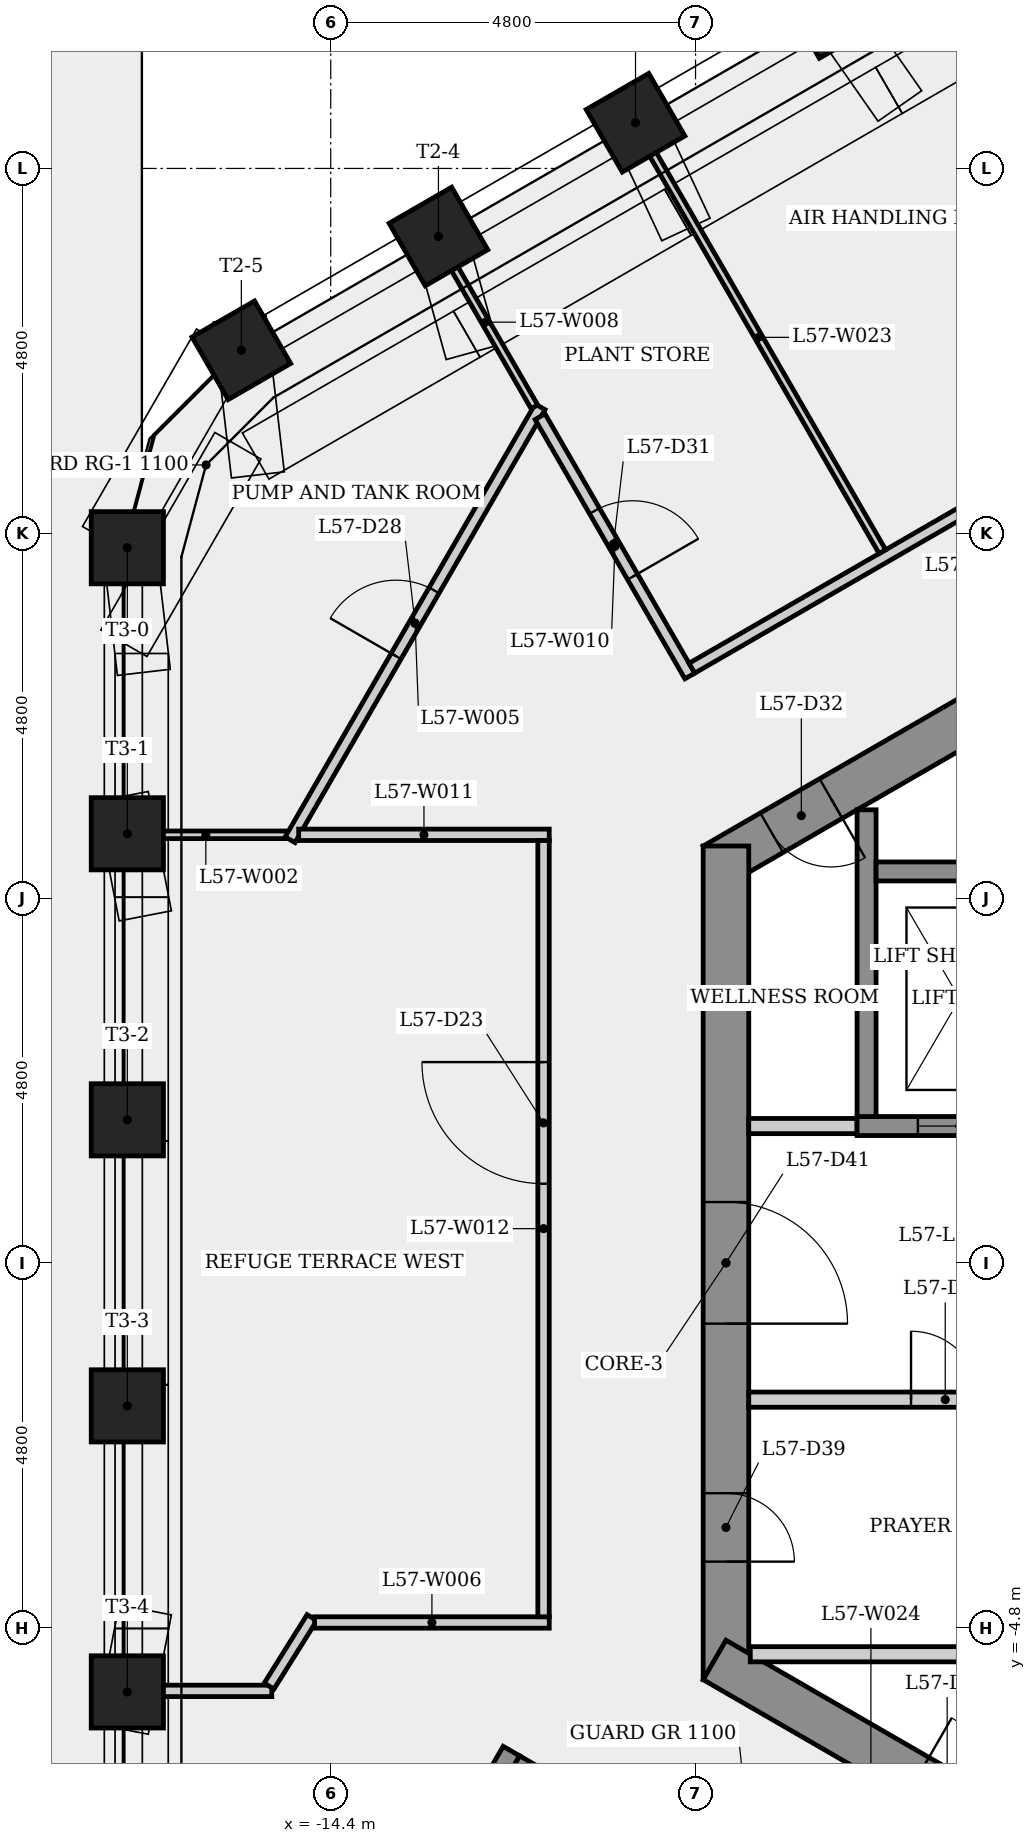
"""IFC4 building model, lengths in metres.
Left out: names, types, materials, properties, quantities, classifications, styles, units other than length and angle.
Written with IfcOpenShell. Run it as: python <this file> out.ifc"""

import sys

from ifc_helpers import new_model, si_unit, direction, frame, frame_2d, origin, origin_2d, place, context, subcontext, project, spatial, rectangle, extrude, element, fill, save


model = new_model("IFC4")
c1 = context("Model", 3, precision=1e-05, world=origin(), true_north=direction((0.0, 1.0)))
c2 = subcontext(c1, "Body", "Model", "MODEL_VIEW")
j1 = project(units=[si_unit("LENGTHUNIT", "METRE"), si_unit("PLANEANGLEUNIT", "RADIAN")], contexts=[c1])
p1 = place(None, origin())
s1 = spatial("IfcSite", under=j1, at=p1, CompositionType="ELEMENT")
p2 = place(p1, origin())
s2 = spatial("IfcBuilding", under=s1, at=p2, CompositionType="ELEMENT")
p3 = place(p2, frame((0.0, 0.0, 214.1)))
s3 = spatial("IfcBuildingStorey", under=s2, at=p3, CompositionType="ELEMENT", Elevation=214.1)
p4 = place(p3, frame((0.15, 10.71, 0.0), z_axis=(0.0, 0.0, 1.0), x_axis=(-0.866023993627, -0.500002442456, 0.0)))
e1 = element("IfcWall", 1, at=p4, inside=s3, PredefinedType="SHEAR", context=c2, shape_type="SweptSolid", body=[
    extrude(rectangle(XDim=10.97, YDim=0.6, at=frame_2d((5.485, 0.0))), origin(), (0.0, 0.0, 1.0), 4.8),
])
p5 = place(p4, frame((9.201, 0.0, 0.0)))
e2 = element("IfcOpeningElement", 2, at=p5, cuts=e1, PredefinedType="OPENING", context=c2, shape_type="SweptSolid", body=[
    extrude(rectangle(XDim=0.9, YDim=2.1, at=frame_2d((0.45, 1.05))), frame((0.0, 0.31, 0.0), z_axis=(0.0, -1.0, 0.0), x_axis=(1.0, 0.0, 0.0)), (0.0, 0.0, 1.0), 0.62),
])
p6 = place(p4, frame((1.744, 0.0, 0.0)))
e3 = element("IfcOpeningElement", 3, at=p6, cuts=e1, PredefinedType="OPENING", context=c2, shape_type="SweptSolid", body=[
    extrude(rectangle(XDim=0.9, YDim=2.1, at=frame_2d((0.45, 1.05))), frame((0.0, 0.31, 0.0), z_axis=(0.0, -1.0, 0.0), x_axis=(1.0, 0.0, 0.0)), (0.0, 0.0, 1.0), 0.62),
])
p7 = place(p3, frame((-9.2, 5.485, 0.0), z_axis=(0.0, 0.0, 1.0), x_axis=(0.0, -1.0, 0.0)))
e4 = element("IfcWall", 4, at=p7, inside=s3, PredefinedType="SHEAR", context=c2, shape_type="SweptSolid", body=[
    extrude(rectangle(XDim=10.97, YDim=0.6, at=frame_2d((5.485, 0.0))), origin(), (0.0, 0.0, 1.0), 4.8),
])
p8 = place(p7, frame((8.516, 0.0, 0.0)))
e5 = element("IfcOpeningElement", 5, at=p8, cuts=e4, PredefinedType="OPENING", context=c2, shape_type="SweptSolid", body=[
    extrude(rectangle(XDim=0.9, YDim=2.1, at=frame_2d((0.45, 1.05))), frame((0.0, 0.31, 0.0), z_axis=(0.0, -1.0, 0.0), x_axis=(1.0, 0.0, 0.0)), (0.0, 0.0, 1.0), 0.62),
])
p9 = place(p7, frame((4.685, 0.0, 0.0)))
e6 = element("IfcOpeningElement", 6, at=p9, cuts=e4, PredefinedType="OPENING", context=c2, shape_type="SweptSolid", body=[
    extrude(rectangle(XDim=1.6, YDim=2.1, at=frame_2d((0.8, 1.05))), frame((0.0, 0.31, 0.0), z_axis=(0.0, -1.0, 0.0), x_axis=(1.0, 0.0, 0.0)), (0.0, 0.0, 1.0), 0.62),
])
p10 = place(p3, frame((-9.35, -5.225, 0.0), z_axis=(0.0, 0.0, 1.0), x_axis=(0.866023993627, -0.500002442456, 0.0)))
e7 = element("IfcWall", 7, at=p10, inside=s3, PredefinedType="SHEAR", context=c2, shape_type="SweptSolid", body=[
    extrude(rectangle(XDim=10.97, YDim=0.6, at=frame_2d((5.485, 0.0))), origin(), (0.0, 0.0, 1.0), 4.8),
])
p11 = place(p10, frame((3.084, 0.0, 0.0)))
e8 = element("IfcOpeningElement", 8, at=p11, cuts=e7, PredefinedType="OPENING", context=c2, shape_type="SweptSolid", body=[
    extrude(rectangle(XDim=0.9, YDim=2.1, at=frame_2d((0.45, 1.05))), frame((0.0, 0.31, 0.0), z_axis=(0.0, -1.0, 0.0), x_axis=(1.0, 0.0, 0.0)), (0.0, 0.0, 1.0), 0.62),
])
p12 = place(p10, frame((8.21, 0.0, 0.0)))
e9 = element("IfcOpeningElement", 9, at=p12, cuts=e7, PredefinedType="OPENING", context=c2, shape_type="SweptSolid", body=[
    extrude(rectangle(XDim=0.9, YDim=2.1, at=frame_2d((0.45, 1.05))), frame((0.0, 0.31, 0.0), z_axis=(0.0, -1.0, 0.0), x_axis=(1.0, 0.0, 0.0)), (0.0, 0.0, 1.0), 0.62),
])
for number, where, z_axis, x_axis in (
    (10, (-7.797, 16.499, 0.0), (0.0, 0.0, 1.0), (-0.5, 0.866, 0.0)),
    (11, (-10.39, 15.001, 0.0), (0.0, 0.0, 1.0), (-0.5, 0.866, 0.0)),
    (12, (-12.983, 13.504, 0.0), (0.0, 0.0, 1.0), (-0.5, 0.866, 0.0)),
    (13, (-15.576, 12.007, 0.0), (0.0, 0.0, 1.0), (-0.5, 0.866, 0.0)),
    (14, (-17.076, 9.409, 0.0), (0.0, 0.0, 1.0), (-1.0, 0.0, 0.0)),
    (15, (-17.076, 5.646, 0.0), (0.0, 0.0, 1.0), (-1.0, 0.0, 0.0)),
    (16, (-17.076, 1.882, 0.0), (0.0, 0.0, 1.0), (-1.0, 0.0, 0.0)),
    (17, (-17.076, -1.882, 0.0), (0.0, 0.0, 1.0), (-1.0, 0.0, 0.0)),
    (18, (-17.076, -5.646, 0.0), (0.0, 0.0, 1.0), (-1.0, 0.0, 0.0)),
):
    element("IfcColumn", number, at=place(p3, frame(where, z_axis=z_axis, x_axis=x_axis)), inside=s3, PredefinedType="COLUMN", context=c2, shape_type="SweptSolid", body=[
        extrude(rectangle(XDim=0.95, YDim=0.95, at=origin_2d()), origin(), (0.0, 0.0, 1.0), 4.45),
    ])
p13 = place(p3, frame((-17.115, -5.632, 0.0), z_axis=(0.0, 0.0, 1.0), x_axis=(1.0, 0.0, 0.0)))
e19 = element("IfcWall", 19, at=p13, inside=s3, PredefinedType="PARTITIONING", context=c2, shape_type="SweptSolid", body=[
    extrude(rectangle(XDim=1.939, YDim=0.15, at=frame_2d((0.97, 0.0))), origin(), (0.0, 0.0, 1.0), 4.45),
])
p14 = place(p3, frame((-17.115, 5.632, 0.0), z_axis=(0.0, 0.0, 1.0), x_axis=(1.0, 0.0, 0.0)))
e20 = element("IfcWall", 20, at=p14, inside=s3, PredefinedType="PARTITIONING", context=c2, shape_type="SweptSolid", body=[
    extrude(rectangle(XDim=2.143, YDim=0.1, at=frame_2d((1.072, 0.0))), origin(), (0.0, 0.0, 1.0), 4.45),
])
p15 = place(p3, frame((-15.211, -5.569, 0.0), z_axis=(0.0, 0.0, 1.0), x_axis=(0.530432882969, 0.847726935201, 0.0)))
e21 = element("IfcWall", 21, at=p15, inside=s3, PredefinedType="PARTITIONING", context=c2, shape_type="SweptSolid", body=[
    extrude(rectangle(XDim=1.062, YDim=0.15, at=frame_2d((0.531, 0.0))), origin(), (0.0, 0.0, 1.0), 4.45),
])
p16 = place(p3, frame((-14.934, 5.567, 0.0), z_axis=(0.0, 0.0, 1.0), x_axis=(0.499975192698, 0.866039725813, 0.0)))
e22 = element("IfcWall", 22, at=p16, inside=s3, PredefinedType="PARTITIONING", context=c2, shape_type="SweptSolid", body=[
    extrude(rectangle(XDim=6.578, YDim=0.15, at=frame_2d((3.289, 0.0))), origin(), (0.0, 0.0, 1.0), 4.45),
])
p17 = place(p16, frame((2.789, 0.0, 0.0)))
e23 = element("IfcOpeningElement", 23, at=p17, cuts=e22, PredefinedType="OPENING", context=c2, shape_type="SweptSolid", body=[
    extrude(rectangle(XDim=1.0, YDim=2.1, at=frame_2d((0.5, 1.05))), frame((0.0, 0.085, 0.0), z_axis=(0.0, -1.0, 0.0), x_axis=(1.0, 0.0, 0.0)), (0.0, 0.0, 1.0), 0.17),
])
p18 = place(p3, frame((-14.612, -4.732, 0.0), z_axis=(0.0, 0.0, 1.0), x_axis=(1.0, 0.0, 0.0)))
e24 = element("IfcWall", 24, at=p18, inside=s3, PredefinedType="PARTITIONING", context=c2, shape_type="SweptSolid", body=[
    extrude(rectangle(XDim=3.087, YDim=0.15, at=frame_2d((1.544, 0.0))), origin(), (0.0, 0.0, 1.0), 4.45),
])
p19 = place(p3, frame((-13.648, -9.239, 0.0), z_axis=(0.0, 0.0, 1.0), x_axis=(0.500017246033, 0.866015446554, 0.0)))
e25 = element("IfcWall", 25, at=p19, inside=s3, PredefinedType="SHEAR", context=c2, shape_type="SweptSolid", body=[
    extrude(rectangle(XDim=3.25, YDim=0.25, at=frame_2d((1.625, 0.0))), origin(), (0.0, 0.0, 1.0), 4.45),
])
p20 = place(p3, frame((-13.006, 13.491, 0.0), z_axis=(0.0, 0.0, 1.0), x_axis=(0.499958048256, -0.86604962328, 0.0)))
e26 = element("IfcWall", 26, at=p20, inside=s3, PredefinedType="PARTITIONING", context=c2, shape_type="SweptSolid", body=[
    extrude(rectangle(XDim=2.572, YDim=0.1, at=frame_2d((1.286, 0.0))), origin(), (0.0, 0.0, 1.0), 2.825),
])
p21 = place(p3, frame((-11.977, -6.595, 0.0), z_axis=(0.0, 0.0, 1.0), x_axis=(0.866025499775, -0.499999833739, 0.0)))
e27 = element("IfcWall", 27, at=p21, inside=s3, PredefinedType="SHEAR", context=c2, shape_type="SweptSolid", body=[
    extrude(rectangle(XDim=6.4, YDim=0.25, at=frame_2d((3.2, 0.0))), origin(), (0.0, 0.0, 1.0), 4.45),
])
p22 = place(p21, frame((5.025, 0.0, 0.0)))
e28 = element("IfcOpeningElement", 28, at=p22, cuts=e27, PredefinedType="OPENING", context=c2, shape_type="SweptSolid", body=[
    extrude(rectangle(XDim=1.0, YDim=2.1, at=frame_2d((0.5, 1.05))), frame((0.0, 0.135, 0.0), z_axis=(0.0, -1.0, 0.0), x_axis=(1.0, 0.0, 0.0)), (0.0, 0.0, 1.0), 0.27),
])
p23 = place(p3, frame((-11.646, 11.134, 0.0), z_axis=(0.0, 0.0, 1.0), x_axis=(0.500044270822, -0.865999842505, 0.0)))
e29 = element("IfcWall", 29, at=p23, inside=s3, PredefinedType="PARTITIONING", context=c2, shape_type="SweptSolid", body=[
    extrude(rectangle(XDim=3.94, YDim=0.15, at=frame_2d((1.97, 0.0))), origin(), (0.0, 0.0, 1.0), 4.45),
])
p24 = place(p23, frame((1.433, 0.0, 0.0)))
e30 = element("IfcOpeningElement", 30, at=p24, cuts=e29, PredefinedType="OPENING", context=c2, shape_type="SweptSolid", body=[
    extrude(rectangle(XDim=1.0, YDim=2.1, at=frame_2d((0.5, 1.05))), frame((0.0, 0.085, 0.0), z_axis=(0.0, -1.0, 0.0), x_axis=(1.0, 0.0, 0.0)), (0.0, 0.0, 1.0), 0.17),
])
p25 = place(p3, frame((-11.525, 5.632, 0.0), z_axis=(0.0, 0.0, 1.0), x_axis=(-1.0, 0.0, 0.0)))
e31 = element("IfcWall", 31, at=p25, inside=s3, PredefinedType="PARTITIONING", context=c2, shape_type="SweptSolid", body=[
    extrude(rectangle(XDim=3.297, YDim=0.15, at=frame_2d((1.648, 0.0))), origin(), (0.0, 0.0, 1.0), 4.45),
])
p26 = place(p3, frame((-11.6, -4.657, 0.0), z_axis=(0.0, 0.0, 1.0), x_axis=(0.0, 1.0, 0.0)))
e32 = element("IfcWall", 32, at=p26, inside=s3, PredefinedType="PARTITIONING", context=c2, shape_type="SweptSolid", body=[
    extrude(rectangle(XDim=10.214, YDim=0.15, at=frame_2d((5.107, 0.0))), origin(), (0.0, 0.0, 1.0), 4.45),
])
p27 = place(p26, frame((5.698, 0.0, 0.0)))
e33 = element("IfcOpeningElement", 33, at=p27, cuts=e32, PredefinedType="OPENING", context=c2, shape_type="SweptSolid", body=[
    extrude(rectangle(XDim=1.6, YDim=2.1, at=frame_2d((0.8, 1.05))), frame((0.0, 0.085, 0.0), z_axis=(0.0, -1.0, 0.0), x_axis=(1.0, 0.0, 0.0)), (0.0, 0.0, 1.0), 0.17),
])
p28 = place(p3, frame((-9.648, 7.824, 0.0), z_axis=(0.0, 0.0, 1.0), x_axis=(0.866024597333, 0.500001396812, 0.0)))
e34 = element("IfcWall", 34, at=p28, inside=s3, PredefinedType="PARTITIONING", context=c2, shape_type="SweptSolid", body=[
    extrude(rectangle(XDim=8.586, YDim=0.15, at=frame_2d((4.293, 0.0))), origin(), (0.0, 0.0, 1.0), 4.45),
])
p29 = place(p28, frame((5.239, 0.0, 0.0)))
e35 = element("IfcOpeningElement", 35, at=p29, cuts=e34, PredefinedType="OPENING", context=c2, shape_type="SweptSolid", body=[
    extrude(rectangle(XDim=1.0, YDim=2.1, at=frame_2d((0.5, 1.05))), frame((0.0, 0.085, 0.0), z_axis=(0.0, -1.0, 0.0), x_axis=(1.0, 0.0, 0.0)), (0.0, 0.0, 1.0), 0.17),
])
p30 = place(p3, frame((-8.9, 1.8, 0.0), z_axis=(0.0, 0.0, 1.0), x_axis=(1.0, 0.0, 0.0)))
e36 = element("IfcWall", 36, at=p30, inside=s3, PredefinedType="PARTITIONING", context=c2, shape_type="SweptSolid", body=[
    extrude(rectangle(XDim=1.425, YDim=0.2, at=frame_2d((0.712, 0.0))), origin(), (0.0, 0.0, 1.0), 4.45),
])
p31 = place(p3, frame((-8.88, -5.15, 0.0), z_axis=(0.0, 0.0, 1.0), x_axis=(1.0, 0.0, 0.0)))
e37 = element("IfcWall", 37, at=p31, inside=s3, PredefinedType="PARTITIONING", context=c2, shape_type="SweptSolid", body=[
    extrude(rectangle(XDim=11.205, YDim=0.2, at=frame_2d((5.603, 0.0))), origin(), (0.0, 0.0, 1.0), 4.45),
])
p32 = place(p3, frame((-7.475, 1.8, 0.0), z_axis=(0.0, 0.0, 1.0), x_axis=(1.0, 0.0, 0.0)))
e38 = element("IfcWall", 38, at=p32, inside=s3, PredefinedType="SHEAR", context=c2, shape_type="SweptSolid", body=[
    extrude(rectangle(XDim=14.95, YDim=0.25, at=frame_2d((7.475, 0.0))), origin(), (0.0, 0.0, 1.0), 4.45),
])
p33 = place(p32, frame((0.8, 0.0, 0.0)))
e39 = element("IfcOpeningElement", 39, at=p33, cuts=e38, PredefinedType="OPENING", context=c2, shape_type="SweptSolid", body=[
    extrude(rectangle(XDim=1.1, YDim=2.1, at=frame_2d((0.55, 1.05))), frame((0.0, 0.135, 0.0), z_axis=(0.0, -1.0, 0.0), x_axis=(1.0, 0.0, 0.0)), (0.0, 0.0, 1.0), 0.27),
])
p34 = place(p32, frame((3.25, 0.0, 0.0)))
e40 = element("IfcOpeningElement", 40, at=p34, cuts=e38, PredefinedType="OPENING", context=c2, shape_type="SweptSolid", body=[
    extrude(rectangle(XDim=1.1, YDim=2.1, at=frame_2d((0.55, 1.05))), frame((0.0, 0.135, 0.0), z_axis=(0.0, -1.0, 0.0), x_axis=(1.0, 0.0, 0.0)), (0.0, 0.0, 1.0), 0.27),
])
p35 = place(p32, frame((5.7, 0.0, 0.0)))
e41 = element("IfcOpeningElement", 41, at=p35, cuts=e38, PredefinedType="OPENING", context=c2, shape_type="SweptSolid", body=[
    extrude(rectangle(XDim=1.1, YDim=2.1, at=frame_2d((0.55, 1.05))), frame((0.0, 0.135, 0.0), z_axis=(0.0, -1.0, 0.0), x_axis=(1.0, 0.0, 0.0)), (0.0, 0.0, 1.0), 0.27),
])
p36 = place(p32, frame((8.15, 0.0, 0.0)))
e42 = element("IfcOpeningElement", 42, at=p36, cuts=e38, PredefinedType="OPENING", context=c2, shape_type="SweptSolid", body=[
    extrude(rectangle(XDim=1.1, YDim=2.1, at=frame_2d((0.55, 1.05))), frame((0.0, 0.135, 0.0), z_axis=(0.0, -1.0, 0.0), x_axis=(1.0, 0.0, 0.0)), (0.0, 0.0, 1.0), 0.27),
])
p37 = place(p32, frame((10.6, 0.0, 0.0)))
e43 = element("IfcOpeningElement", 43, at=p37, cuts=e38, PredefinedType="OPENING", context=c2, shape_type="SweptSolid", body=[
    extrude(rectangle(XDim=1.1, YDim=2.1, at=frame_2d((0.55, 1.05))), frame((0.0, 0.135, 0.0), z_axis=(0.0, -1.0, 0.0), x_axis=(1.0, 0.0, 0.0)), (0.0, 0.0, 1.0), 0.27),
])
p38 = place(p32, frame((13.05, 0.0, 0.0)))
e44 = element("IfcOpeningElement", 44, at=p38, cuts=e38, PredefinedType="OPENING", context=c2, shape_type="SweptSolid", body=[
    extrude(rectangle(XDim=1.1, YDim=2.1, at=frame_2d((0.55, 1.05))), frame((0.0, 0.135, 0.0), z_axis=(0.0, -1.0, 0.0), x_axis=(1.0, 0.0, 0.0)), (0.0, 0.0, 1.0), 0.27),
])
p39 = place(p3, frame((-7.35, 1.925, 0.0), z_axis=(0.0, 0.0, 1.0), x_axis=(0.0, 1.0, 0.0)))
e45 = element("IfcWall", 45, at=p39, inside=s3, PredefinedType="SHEAR", context=c2, shape_type="SweptSolid", body=[
    extrude(rectangle(XDim=4.036, YDim=0.25, at=frame_2d((2.018, 0.0))), origin(), (0.0, 0.0, 1.0), 4.45),
])
p40 = place(p3, frame((-7.225, 5.15, 0.0), z_axis=(0.0, 0.0, 1.0), x_axis=(1.0, 0.0, 0.0)))
e46 = element("IfcWall", 46, at=p40, inside=s3, PredefinedType="SHEAR", context=c2, shape_type="SweptSolid", body=[
    extrude(rectangle(XDim=14.7, YDim=0.25, at=frame_2d((7.35, 0.0))), origin(), (0.0, 0.0, 1.0), 4.45),
])
p41 = place(p3, frame((-7.142, 9.358, 0.0), z_axis=(0.0, 0.0, 1.0), x_axis=(-0.500010221068, 0.866019502567, 0.0)))
e47 = element("IfcWall", 47, at=p41, inside=s3, PredefinedType="PARTITIONING", context=c2, shape_type="SweptSolid", body=[
    extrude(rectangle(XDim=6.511, YDim=0.1, at=frame_2d((3.256, 0.0))), origin(), (0.0, 0.0, 1.0), 2.825),
])
p42 = place(p3, frame((-8.9, -1.8, 0.0), z_axis=(0.0, 0.0, 1.0), x_axis=(1.0, 0.0, 0.0)))
e48 = element("IfcWall", 48, at=p42, inside=s3, PredefinedType="PARTITIONING", context=c2, shape_type="SweptSolid", body=[
    extrude(rectangle(XDim=11.225, YDim=0.2, at=frame_2d((5.613, 0.0))), origin(), (0.0, 0.0, 1.0), 4.45),
])
p43 = place(p42, frame((2.135, 0.0, 0.0)))
e49 = element("IfcOpeningElement", 49, at=p43, cuts=e48, PredefinedType="OPENING", context=c2, shape_type="SweptSolid", body=[
    extrude(rectangle(XDim=0.9, YDim=2.1, at=frame_2d((0.45, 1.05))), frame((0.0, 0.11, 0.0), z_axis=(0.0, -1.0, 0.0), x_axis=(1.0, 0.0, 0.0)), (0.0, 0.0, 1.0), 0.22),
])
p44 = place(p42, frame((6.61, 0.0, 0.0)))
e50 = element("IfcOpeningElement", 50, at=p44, cuts=e48, PredefinedType="OPENING", context=c2, shape_type="SweptSolid", body=[
    extrude(rectangle(XDim=0.9, YDim=2.1, at=frame_2d((0.45, 1.05))), frame((0.0, 0.11, 0.0), z_axis=(0.0, -1.0, 0.0), x_axis=(1.0, 0.0, 0.0)), (0.0, 0.0, 1.0), 0.22),
])
p45 = place(p42, frame((9.613, 0.0, 0.0)))
e51 = element("IfcOpeningElement", 51, at=p45, cuts=e48, PredefinedType="OPENING", context=c2, shape_type="SweptSolid", body=[
    extrude(rectangle(XDim=0.9, YDim=2.1, at=frame_2d((0.45, 1.05))), frame((0.0, 0.11, 0.0), z_axis=(0.0, -1.0, 0.0), x_axis=(1.0, 0.0, 0.0)), (0.0, 0.0, 1.0), 0.22),
])
p46 = place(p33, origin())
e52 = element("IfcDoor", 52, at=p46, inside=s3, OperationType="SLIDING_TO_LEFT", PredefinedType="DOOR", context=c2, shape_type="SweptSolid", body=[
    extrude(rectangle(XDim=1.1, YDim=2.1, at=frame_2d((0.55, 1.05))), frame((0.0, 0.025, 0.0), z_axis=(0.0, -1.0, 0.0), x_axis=(1.0, 0.0, 0.0)), (0.0, 0.0, 1.0), 0.05),
])
fill(e39, e52)
p47 = place(p43, origin())
e53 = element("IfcDoor", 53, at=p47, inside=s3, OperationType="SINGLE_SWING_LEFT", PredefinedType="DOOR", context=c2, shape_type="SweptSolid", body=[
    extrude(rectangle(XDim=0.9, YDim=2.1, at=frame_2d((0.45, 1.05))), frame((0.0, 0.025, 0.0), z_axis=(0.0, -1.0, 0.0), x_axis=(1.0, 0.0, 0.0)), (0.0, 0.0, 1.0), 0.05),
])
fill(e49, e53)
p48 = place(p27, origin())
e54 = element("IfcDoor", 54, at=p48, inside=s3, OperationType="SINGLE_SWING_RIGHT", PredefinedType="DOOR", context=c2, shape_type="SweptSolid", body=[
    extrude(rectangle(XDim=1.6, YDim=2.1, at=frame_2d((0.8, 1.05))), frame((0.0, 0.025, 0.0), z_axis=(0.0, -1.0, 0.0), x_axis=(1.0, 0.0, 0.0)), (0.0, 0.0, 1.0), 0.05),
])
fill(e33, e54)
p49 = place(p17, origin())
e55 = element("IfcDoor", 55, at=p49, inside=s3, OperationType="SINGLE_SWING_LEFT", PredefinedType="DOOR", context=c2, shape_type="SweptSolid", body=[
    extrude(rectangle(XDim=1.0, YDim=2.1, at=frame_2d((0.5, 1.05))), frame((0.0, 0.025, 0.0), z_axis=(0.0, -1.0, 0.0), x_axis=(1.0, 0.0, 0.0)), (0.0, 0.0, 1.0), 0.05),
])
fill(e23, e55)
p50 = place(p24, origin())
e56 = element("IfcDoor", 56, at=p50, inside=s3, OperationType="SINGLE_SWING_RIGHT", PredefinedType="DOOR", context=c2, shape_type="SweptSolid", body=[
    extrude(rectangle(XDim=1.0, YDim=2.1, at=frame_2d((0.5, 1.05))), frame((0.0, 0.025, 0.0), z_axis=(0.0, -1.0, 0.0), x_axis=(1.0, 0.0, 0.0)), (0.0, 0.0, 1.0), 0.05),
])
fill(e30, e56)
p51 = place(p5, origin())
e57 = element("IfcDoor", 57, at=p51, inside=s3, OperationType="SINGLE_SWING_LEFT", PredefinedType="DOOR", context=c2, shape_type="SweptSolid", body=[
    extrude(rectangle(XDim=0.9, YDim=2.1, at=frame_2d((0.45, 1.05))), frame((0.0, 0.025, 0.0), z_axis=(0.0, -1.0, 0.0), x_axis=(1.0, 0.0, 0.0)), (0.0, 0.0, 1.0), 0.05),
])
fill(e2, e57)
p52 = place(p8, origin())
e58 = element("IfcDoor", 58, at=p52, inside=s3, OperationType="SINGLE_SWING_RIGHT", PredefinedType="DOOR", context=c2, shape_type="SweptSolid", body=[
    extrude(rectangle(XDim=0.9, YDim=2.1, at=frame_2d((0.45, 1.05))), frame((0.0, 0.025, 0.0), z_axis=(0.0, -1.0, 0.0), x_axis=(1.0, 0.0, 0.0)), (0.0, 0.0, 1.0), 0.05),
])
fill(e5, e58)
p53 = place(p9, origin())
e59 = element("IfcDoor", 59, at=p53, inside=s3, OperationType="SINGLE_SWING_RIGHT", PredefinedType="DOOR", context=c2, shape_type="SweptSolid", body=[
    extrude(rectangle(XDim=1.6, YDim=2.1, at=frame_2d((0.8, 1.05))), frame((0.0, 0.025, 0.0), z_axis=(0.0, -1.0, 0.0), x_axis=(1.0, 0.0, 0.0)), (0.0, 0.0, 1.0), 0.05),
])
fill(e6, e59)
save(model, sys.argv[1])
